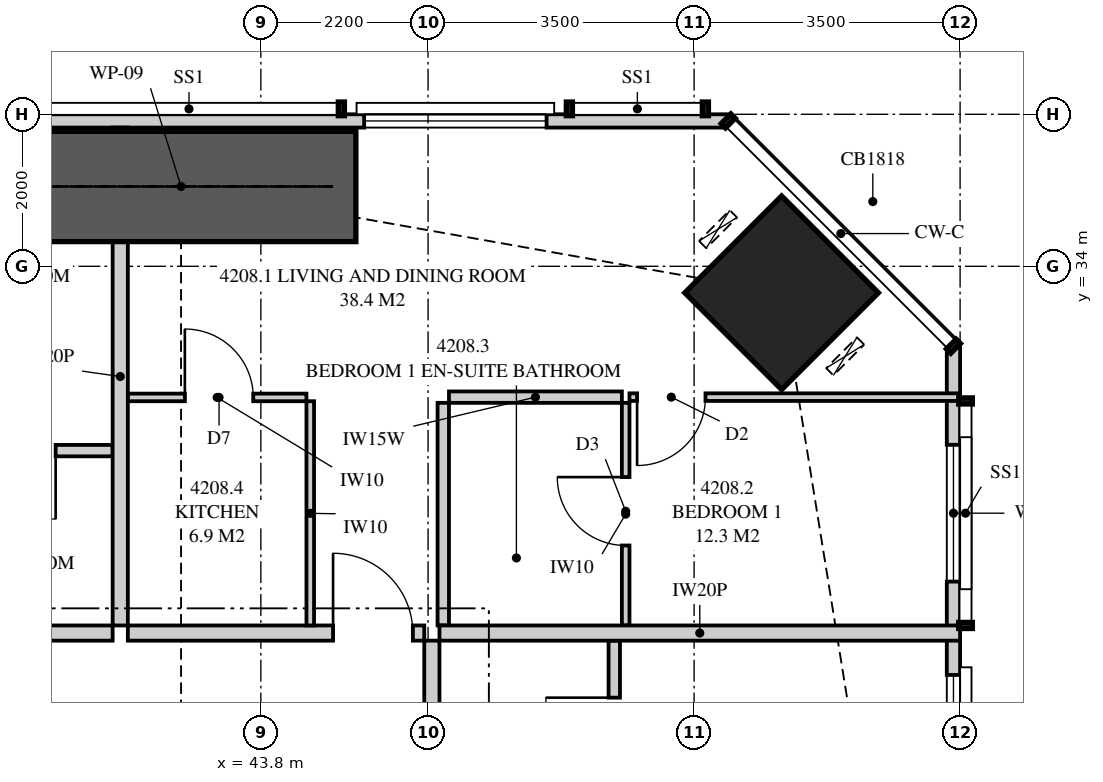
"""IFC4 building model, lengths in metres.
Left out: names, types, materials, properties, quantities, classifications, styles, units other than length and angle.
Written with IfcOpenShell. Run it as: python <this file> out.ifc"""

import sys

from ifc_helpers import new_model, si_unit, direction, frame, frame_2d, origin, origin_2d, place, context, subcontext, project, spatial, polyline, rectangle, hollow_rectangle, outline, extrude, element, fill, save


model = new_model("IFC4")
c1 = context("Model", 3, precision=1e-05, world=origin(), true_north=direction((0.0, 1.0)))
c2 = subcontext(c1, "Body", "Model", "MODEL_VIEW")
j1 = project(units=[si_unit("LENGTHUNIT", "METRE"), si_unit("PLANEANGLEUNIT", "RADIAN")], contexts=[c1])
p1 = place(None, origin())
s1 = spatial("IfcSite", under=j1, at=p1, CompositionType="ELEMENT")
p2 = place(p1, origin())
s2 = spatial("IfcBuilding", under=s1, at=p2, CompositionType="ELEMENT")
p3 = place(p2, frame((0.0, 0.0, 157.7)))
s3 = spatial("IfcBuildingStorey", under=s2, at=p3, CompositionType="ELEMENT", Elevation=157.7)
p4 = place(p3, frame((50.652, 33.652, 0.0), z_axis=(0.0, 0.0, 1.0), x_axis=(-0.707106781187, -0.707106781187, 0.0)))
e1 = element("IfcColumn", 1, at=p4, inside=s3, PredefinedType="COLUMN", context=c2, shape_type="SweptSolid", body=[
    extrude(hollow_rectangle(XDim=1.8, YDim=1.8, WallThickness=0.125, at=origin_2d()), origin(), (0.0, 0.0, 1.0), 3.35),
])
p5 = place(p3, frame((52.913, 3.051, 0.0), z_axis=(0.0, 0.0, 1.0), x_axis=(0.0, 1.0, 0.0)))
e2 = element("IfcWall", 2, at=p5, inside=s3, PredefinedType="SOLIDWALL", context=c2, shape_type="SweptSolid", body=[
    extrude(outline(polyline([(0.0, 0.0), (29.897, 0.0), (29.897, 3.11), (22.167, 3.11), (22.167, 2.15), (22.074, 2.15), (22.074, 3.11), (21.949, 3.11), (21.949, 2.15), (9.949, 2.15), (9.949, 3.11), (9.847, 3.11), (9.847, 2.15), (9.706, 2.15), (9.706, 3.11), (0.0, 3.11), (0.0, 0.0)])), frame((0.0, 0.087, 0.0), z_axis=(0.0, -1.0, 0.0), x_axis=(1.0, 0.0, 0.0)), (0.0, 0.0, 1.0), 0.175),
])
p6 = place(p5, frame((1.797, 0.0, 0.4)))
e3 = element("IfcOpeningElement", 3, at=p6, cuts=e2, PredefinedType="OPENING", context=c2, shape_type="SweptSolid", body=[
    extrude(rectangle(XDim=1.8, YDim=1.7, at=frame_2d((0.9, 0.85))), frame((0.0, 0.097, 0.0), z_axis=(0.0, -1.0, 0.0), x_axis=(1.0, 0.0, 0.0)), (0.0, 0.0, 1.0), 0.195),
])
p7 = place(p5, frame((5.149, 0.0, 0.4)))
e4 = element("IfcOpeningElement", 4, at=p7, cuts=e2, PredefinedType="OPENING", context=c2, shape_type="SweptSolid", body=[
    extrude(rectangle(XDim=2.4, YDim=1.7, at=frame_2d((1.2, 0.85))), frame((0.0, 0.097, 0.0), z_axis=(0.0, -1.0, 0.0), x_axis=(1.0, 0.0, 0.0)), (0.0, 0.0, 1.0), 0.195),
])
p8 = place(p5, frame((15.274, 0.0, 0.0)))
e5 = element("IfcOpeningElement", 5, at=p8, cuts=e2, PredefinedType="OPENING", context=c2, shape_type="SweptSolid", body=[
    extrude(rectangle(XDim=1.8, YDim=2.1, at=frame_2d((0.9, 1.05))), frame((0.0, 0.097, 0.0), z_axis=(0.0, -1.0, 0.0), x_axis=(1.0, 0.0, 0.0)), (0.0, 0.0, 1.0), 0.195),
])
p9 = place(p5, frame((12.349, 0.0, 0.4)))
e6 = element("IfcOpeningElement", 6, at=p9, cuts=e2, PredefinedType="OPENING", context=c2, shape_type="SweptSolid", body=[
    extrude(rectangle(XDim=2.4, YDim=1.7, at=frame_2d((1.2, 0.85))), frame((0.0, 0.097, 0.0), z_axis=(0.0, -1.0, 0.0), x_axis=(1.0, 0.0, 0.0)), (0.0, 0.0, 1.0), 0.195),
])
p10 = place(p5, frame((24.373, 0.0, 0.4)))
e7 = element("IfcOpeningElement", 7, at=p10, cuts=e2, PredefinedType="OPENING", context=c2, shape_type="SweptSolid", body=[
    extrude(rectangle(XDim=1.2, YDim=1.7, at=frame_2d((0.6, 0.85))), frame((0.0, 0.097, 0.0), z_axis=(0.0, -1.0, 0.0), x_axis=(1.0, 0.0, 0.0)), (0.0, 0.0, 1.0), 0.195),
])
p11 = place(p5, frame((26.801, 0.0, 0.4)))
e8 = element("IfcOpeningElement", 8, at=p11, cuts=e2, PredefinedType="OPENING", context=c2, shape_type="SweptSolid", body=[
    extrude(rectangle(XDim=1.8, YDim=1.7, at=frame_2d((0.9, 0.85))), frame((0.0, 0.097, 0.0), z_axis=(0.0, -1.0, 0.0), x_axis=(1.0, 0.0, 0.0)), (0.0, 0.0, 1.0), 0.195),
])
p12 = place(p3, frame((49.949, 35.913, 0.0), z_axis=(0.0, 0.0, 1.0), x_axis=(-1.0, 0.0, 0.0)))
e9 = element("IfcWall", 9, at=p12, inside=s3, PredefinedType="SOLIDWALL", context=c2, shape_type="SweptSolid", body=[
    extrude(outline(polyline([(0.0, 0.0), (34.897, 0.0), (34.897, 3.11), (27.91, 3.11), (27.91, 2.15), (27.836, 2.15), (27.836, 3.11), (27.699, 3.11), (27.699, 2.15), (7.199, 2.15), (7.199, 3.11), (7.062, 3.11), (7.062, 2.15), (6.987, 2.15), (6.987, 3.11), (0.0, 3.11), (0.0, 0.0)])), frame((0.0, 0.087, 0.0), z_axis=(0.0, -1.0, 0.0), x_axis=(1.0, 0.0, 0.0)), (0.0, 0.0, 1.0), 0.175),
])
p13 = place(p12, frame((2.389, 0.0, 0.4)))
e10 = element("IfcOpeningElement", 10, at=p13, cuts=e9, PredefinedType="OPENING", context=c2, shape_type="SweptSolid", body=[
    extrude(rectangle(XDim=2.4, YDim=1.7, at=frame_2d((1.2, 0.85))), frame((0.0, 0.097, 0.0), z_axis=(0.0, -1.0, 0.0), x_axis=(1.0, 0.0, 0.0)), (0.0, 0.0, 1.0), 0.195),
])
p14 = place(p12, frame((10.299, 0.0, 0.0)))
e11 = element("IfcOpeningElement", 11, at=p14, cuts=e9, PredefinedType="OPENING", context=c2, shape_type="SweptSolid", body=[
    extrude(rectangle(XDim=1.8, YDim=2.1, at=frame_2d((0.9, 1.05))), frame((0.0, 0.097, 0.0), z_axis=(0.0, -1.0, 0.0), x_axis=(1.0, 0.0, 0.0)), (0.0, 0.0, 1.0), 0.195),
])
p15 = place(p12, frame((12.649, 0.0, 0.4)))
e12 = element("IfcOpeningElement", 12, at=p15, cuts=e9, PredefinedType="OPENING", context=c2, shape_type="SweptSolid", body=[
    extrude(rectangle(XDim=2.4, YDim=1.7, at=frame_2d((1.2, 0.85))), frame((0.0, 0.097, 0.0), z_axis=(0.0, -1.0, 0.0), x_axis=(1.0, 0.0, 0.0)), (0.0, 0.0, 1.0), 0.195),
])
p16 = place(p12, frame((22.699, 0.0, 0.0)))
e13 = element("IfcOpeningElement", 13, at=p16, cuts=e9, PredefinedType="OPENING", context=c2, shape_type="SweptSolid", body=[
    extrude(rectangle(XDim=1.8, YDim=2.1, at=frame_2d((0.9, 1.05))), frame((0.0, 0.097, 0.0), z_axis=(0.0, -1.0, 0.0), x_axis=(1.0, 0.0, 0.0)), (0.0, 0.0, 1.0), 0.195),
])
p17 = place(p12, frame((19.849, 0.0, 0.4)))
e14 = element("IfcOpeningElement", 14, at=p17, cuts=e9, PredefinedType="OPENING", context=c2, shape_type="SweptSolid", body=[
    extrude(rectangle(XDim=2.4, YDim=1.7, at=frame_2d((1.2, 0.85))), frame((0.0, 0.097, 0.0), z_axis=(0.0, -1.0, 0.0), x_axis=(1.0, 0.0, 0.0)), (0.0, 0.0, 1.0), 0.195),
])
p18 = place(p12, frame((30.973, 0.0, 0.4)))
e15 = element("IfcOpeningElement", 15, at=p18, cuts=e9, PredefinedType="OPENING", context=c2, shape_type="SweptSolid", body=[
    extrude(rectangle(XDim=2.4, YDim=1.7, at=frame_2d((1.2, 0.85))), frame((0.0, 0.097, 0.0), z_axis=(0.0, -1.0, 0.0), x_axis=(1.0, 0.0, 0.0)), (0.0, 0.0, 1.0), 0.195),
])
p19 = place(p3, frame((41.95, 35.825, 0.0), z_axis=(0.0, 0.0, 1.0), x_axis=(0.0, -1.0, 0.0)))
e16 = element("IfcWall", 16, at=p19, inside=s3, PredefinedType="PARTITIONING", context=c2, shape_type="SweptSolid", body=[
    extrude(outline(polyline([(0.529, 2.15), (0.0, 2.15), (0.0, 0.0), (0.529, 0.0), (0.529, 0.876), (1.021, 0.876), (1.021, 0.0), (6.55, 0.0), (6.55, 3.11), (1.685, 3.11), (1.685, 2.15), (1.021, 2.15), (1.021, 1.274), (0.529, 1.274), (0.529, 2.15)])), frame((0.0, 0.1, 0.0), z_axis=(0.0, -1.0, 0.0), x_axis=(1.0, 0.0, 0.0)), (0.0, 0.0, 1.0), 0.2),
])
p20 = place(p3, frame((34.3, 29.175, 0.0), z_axis=(0.0, 0.0, 1.0), x_axis=(1.0, 0.0, 0.0)))
e17 = element("IfcWall", 17, at=p20, inside=s3, PredefinedType="PARTITIONING", context=c2, shape_type="SweptSolid", body=[
    extrude(rectangle(XDim=7.55, YDim=0.2, at=frame_2d((3.775, 0.0))), origin(), (0.0, 0.0, 1.0), 3.11),
])
p21 = place(p20, frame((3.275, 0.0, 0.0)))
e18 = element("IfcOpeningElement", 18, at=p21, cuts=e17, PredefinedType="OPENING", context=c2, shape_type="SweptSolid", body=[
    extrude(rectangle(XDim=1.05, YDim=2.2, at=frame_2d((0.525, 1.1))), frame((0.0, 0.11, 0.0), z_axis=(0.0, -1.0, 0.0), x_axis=(1.0, 0.0, 0.0)), (0.0, 0.0, 1.0), 0.22),
])
p22 = place(p3, frame((39.425, 31.575, 0.0), z_axis=(0.0, 0.0, 1.0), x_axis=(1.0, 0.0, 0.0)))
e19 = element("IfcWall", 19, at=p22, inside=s3, PredefinedType="PLUMBINGWALL", context=c2, shape_type="SweptSolid", body=[
    extrude(rectangle(XDim=2.425, YDim=0.15, at=frame_2d((1.212, 0.0))), origin(), (0.0, 0.0, 1.0), 3.11),
])
p23 = place(p22, frame((0.775, 0.0, 0.0)))
e20 = element("IfcOpeningElement", 20, at=p23, cuts=e19, PredefinedType="OPENING", context=c2, shape_type="SweptSolid", body=[
    extrude(rectangle(XDim=0.9, YDim=2.1, at=frame_2d((0.45, 1.05))), frame((0.0, 0.085, 0.0), z_axis=(0.0, -1.0, 0.0), x_axis=(1.0, 0.0, 0.0)), (0.0, 0.0, 1.0), 0.17),
])
p24 = place(p3, frame((42.05, 29.175, 0.0), z_axis=(0.0, 0.0, 1.0), x_axis=(1.0, 0.0, 0.0)))
e21 = element("IfcWall", 21, at=p24, inside=s3, PredefinedType="PARTITIONING", context=c2, shape_type="SweptSolid", body=[
    extrude(outline(polyline([(0.0, 0.0), (3.9, 0.0), (3.9, 3.11), (1.046, 3.11), (1.046, 2.531), (0.354, 2.531), (0.354, 3.11), (0.0, 3.11), (0.0, 0.0)])), frame((0.0, 0.1, 0.0), z_axis=(0.0, -1.0, 0.0), x_axis=(1.0, 0.0, 0.0)), (0.0, 0.0, 1.0), 0.2),
])
p25 = place(p24, frame((2.7, 0.0, 0.0)))
e22 = element("IfcOpeningElement", 22, at=p25, cuts=e21, PredefinedType="OPENING", context=c2, shape_type="SweptSolid", body=[
    extrude(rectangle(XDim=1.05, YDim=2.2, at=frame_2d((0.525, 1.1))), frame((0.0, 0.11, 0.0), z_axis=(0.0, -1.0, 0.0), x_axis=(1.0, 0.0, 0.0)), (0.0, 0.0, 1.0), 0.22),
])
p26 = place(p3, frame((48.6, 32.204, 0.0), z_axis=(0.0, 0.0, 1.0), x_axis=(0.0, -1.0, 0.0)))
e23 = element("IfcWall", 23, at=p26, inside=s3, PredefinedType="PARTITIONING", context=c2, shape_type="SweptSolid", body=[
    extrude(rectangle(XDim=2.929, YDim=0.1, at=frame_2d((1.464, 0.0))), origin(), (0.0, 0.0, 1.0), 3.11),
])
p27 = place(p26, frame((0.977, 0.0, 0.0)))
e24 = element("IfcOpeningElement", 24, at=p27, cuts=e23, PredefinedType="OPENING", context=c2, shape_type="SweptSolid", body=[
    extrude(rectangle(XDim=0.9, YDim=2.1, at=frame_2d((0.45, 1.05))), frame((0.0, 0.06, 0.0), z_axis=(0.0, -1.0, 0.0), x_axis=(1.0, 0.0, 0.0)), (0.0, 0.0, 1.0), 0.12),
])
p28 = place(p3, frame((48.65, 32.279, 0.0), z_axis=(0.0, 0.0, 1.0), x_axis=(1.0, 0.0, 0.0)))
e25 = element("IfcWall", 25, at=p28, inside=s3, PredefinedType="PARTITIONING", context=c2, shape_type="SweptSolid", body=[
    extrude(outline(polyline([(0.0, 0.0), (4.35, 0.0), (4.35, 3.11), (3.094, 3.11), (3.094, 2.15), (1.352, 2.15), (1.352, 3.11), (0.0, 3.11), (0.0, 0.0)])), frame((0.0, 0.05, 0.0), z_axis=(0.0, -1.0, 0.0), x_axis=(1.0, 0.0, 0.0)), (0.0, 0.0, 1.0), 0.1),
])
p29 = place(p28, frame((0.1, 0.0, 0.0)))
e26 = element("IfcOpeningElement", 26, at=p29, cuts=e25, PredefinedType="OPENING", context=c2, shape_type="SweptSolid", body=[
    extrude(rectangle(XDim=0.9, YDim=2.1, at=frame_2d((0.45, 1.05))), frame((0.0, 0.06, 0.0), z_axis=(0.0, -1.0, 0.0), x_axis=(1.0, 0.0, 0.0)), (0.0, 0.0, 1.0), 0.12),
])
p30 = place(p3, frame((46.275, 32.279, 0.0), z_axis=(0.0, 0.0, 1.0), x_axis=(1.0, 0.0, 0.0)))
e27 = element("IfcWall", 27, at=p30, inside=s3, PredefinedType="PLUMBINGWALL", context=c2, shape_type="SweptSolid", body=[
    extrude(rectangle(XDim=2.275, YDim=0.15, at=frame_2d((1.138, 0.0))), origin(), (0.0, 0.0, 1.0), 3.11),
])
p31 = place(p3, frame((46.2, 32.204, 0.0), z_axis=(0.0, 0.0, 1.0), x_axis=(0.0, -1.0, 0.0)))
e28 = element("IfcWall", 28, at=p31, inside=s3, PredefinedType="PLUMBINGWALL", context=c2, shape_type="SweptSolid", body=[
    extrude(rectangle(XDim=2.929, YDim=0.15, at=frame_2d((1.464, 0.0))), origin(), (0.0, 0.0, 1.0), 3.11),
])
p32 = place(p3, frame((42.05, 32.275, 0.0), z_axis=(0.0, 0.0, 1.0), x_axis=(1.0, 0.0, 0.0)))
e29 = element("IfcWall", 29, at=p32, inside=s3, PredefinedType="PARTITIONING", context=c2, shape_type="SweptSolid", body=[
    extrude(outline(polyline([(0.0, 0.0), (2.35, 0.0), (2.35, 3.11), (0.996, 3.11), (0.996, 2.531), (0.404, 2.531), (0.404, 3.11), (0.0, 3.11), (0.0, 0.0)])), frame((0.0, 0.05, 0.0), z_axis=(0.0, -1.0, 0.0), x_axis=(1.0, 0.0, 0.0)), (0.0, 0.0, 1.0), 0.1),
])
p33 = place(p32, frame((0.75, 0.0, 0.0)))
e30 = element("IfcOpeningElement", 30, at=p33, cuts=e29, PredefinedType="OPENING", context=c2, shape_type="SweptSolid", body=[
    extrude(rectangle(XDim=0.9, YDim=2.1, at=frame_2d((0.45, 1.05))), frame((0.0, 0.06, 0.0), z_axis=(0.0, -1.0, 0.0), x_axis=(1.0, 0.0, 0.0)), (0.0, 0.0, 1.0), 0.12),
])
p34 = place(p3, frame((44.45, 32.225, 0.0), z_axis=(0.0, 0.0, 1.0), x_axis=(0.0, -1.0, 0.0)))
e31 = element("IfcWall", 31, at=p34, inside=s3, PredefinedType="PARTITIONING", context=c2, shape_type="SweptSolid", body=[
    extrude(rectangle(XDim=2.95, YDim=0.1, at=frame_2d((1.475, 0.0))), origin(), (0.0, 0.0, 1.0), 3.11),
])
p35 = place(p3, frame((46.15, 29.175, 0.0), z_axis=(0.0, 0.0, 1.0), x_axis=(1.0, 0.0, 0.0)))
e32 = element("IfcWall", 32, at=p35, inside=s3, PredefinedType="PARTITIONING", context=c2, shape_type="SweptSolid", body=[
    extrude(outline(polyline([(0.0, 0.0), (6.85, 0.0), (6.85, 3.11), (6.147, 3.11), (6.147, 2.15), (4.303, 2.15), (4.303, 3.11), (0.0, 3.11), (0.0, 0.0)])), frame((0.0, 0.1, 0.0), z_axis=(0.0, -1.0, 0.0), x_axis=(1.0, 0.0, 0.0)), (0.0, 0.0, 1.0), 0.2),
])
p36 = place(p3, frame((46.05, 22.9, 0.0), z_axis=(0.0, 0.0, 1.0), x_axis=(0.0, 1.0, 0.0)))
e33 = element("IfcWall", 33, at=p36, inside=s3, PredefinedType="PARTITIONING", context=c2, shape_type="SweptSolid", body=[
    extrude(outline(polyline([(0.0, 0.0), (6.175, 0.0), (6.175, 3.11), (2.446, 3.11), (2.446, 2.531), (1.754, 2.531), (1.754, 3.11), (0.0, 3.11), (0.0, 0.0)])), frame((0.0, 0.1, 0.0), z_axis=(0.0, -1.0, 0.0), x_axis=(1.0, 0.0, 0.0)), (0.0, 0.0, 1.0), 0.2),
])
p37 = place(p36, frame((2.587, 0.0, 0.0)))
e34 = element("IfcOpeningElement", 34, at=p37, cuts=e33, PredefinedType="OPENING", context=c2, shape_type="SweptSolid", body=[
    extrude(rectangle(XDim=1.05, YDim=2.2, at=frame_2d((0.525, 1.1))), frame((0.0, 0.11, 0.0), z_axis=(0.0, -1.0, 0.0), x_axis=(1.0, 0.0, 0.0)), (0.0, 0.0, 1.0), 0.22),
])
p38 = place(p3, frame((48.45, 26.65, 0.0), z_axis=(0.0, 0.0, 1.0), x_axis=(0.0, 1.0, 0.0)))
e35 = element("IfcWall", 35, at=p38, inside=s3, PredefinedType="PLUMBINGWALL", context=c2, shape_type="SweptSolid", body=[
    extrude(rectangle(XDim=2.425, YDim=0.15, at=frame_2d((1.212, 0.0))), origin(), (0.0, 0.0, 1.0), 3.11),
])
p39 = place(p38, frame((0.775, 0.0, 0.0)))
e36 = element("IfcOpeningElement", 36, at=p39, cuts=e35, PredefinedType="OPENING", context=c2, shape_type="SweptSolid", body=[
    extrude(rectangle(XDim=0.9, YDim=2.1, at=frame_2d((0.45, 1.05))), frame((0.0, 0.085, 0.0), z_axis=(0.0, -1.0, 0.0), x_axis=(1.0, 0.0, 0.0)), (0.0, 0.0, 1.0), 0.17),
])
p40 = place(p3, frame((40.45, 35.05, 0.0), z_axis=(0.0, 0.0, 1.0), x_axis=(1.0, 0.0, 0.0)))
e37 = element("IfcWall", 37, at=p40, inside=s3, PredefinedType="SHEAR", context=c2, shape_type="SweptSolid", body=[
    extrude(rectangle(XDim=4.6, YDim=1.45, at=frame_2d((2.3, 0.0))), origin(), (0.0, 0.0, 1.0), 3.35),
])
p41 = place(p10, origin())
e38 = element("IfcWindow", 38, at=p41, inside=s3, PartitioningType="SINGLE_PANEL", PredefinedType="WINDOW", context=c2, shape_type="SweptSolid", body=[
    extrude(rectangle(XDim=1.2, YDim=1.7, at=frame_2d((0.6, 0.85))), frame((0.0, 0.03, 0.0), z_axis=(0.0, -1.0, 0.0), x_axis=(1.0, 0.0, 0.0)), (0.0, 0.0, 1.0), 0.06),
])
fill(e7, e38)
p42 = place(p11, origin())
e39 = element("IfcWindow", 39, at=p42, inside=s3, PartitioningType="SINGLE_PANEL", PredefinedType="WINDOW", context=c2, shape_type="SweptSolid", body=[
    extrude(rectangle(XDim=1.8, YDim=1.7, at=frame_2d((0.9, 0.85))), frame((0.0, 0.03, 0.0), z_axis=(0.0, -1.0, 0.0), x_axis=(1.0, 0.0, 0.0)), (0.0, 0.0, 1.0), 0.06),
])
fill(e8, e39)
p43 = place(p13, origin())
e40 = element("IfcWindow", 40, at=p43, inside=s3, PartitioningType="SINGLE_PANEL", PredefinedType="WINDOW", context=c2, shape_type="SweptSolid", body=[
    extrude(rectangle(XDim=2.4, YDim=1.7, at=frame_2d((1.2, 0.85))), frame((0.0, 0.03, 0.0), z_axis=(0.0, -1.0, 0.0), x_axis=(1.0, 0.0, 0.0)), (0.0, 0.0, 1.0), 0.06),
])
fill(e10, e40)
p44 = place(p23, frame((0.9, 0.0, 0.0), z_axis=(0.0, 0.0, 1.0), x_axis=(-1.0, 0.0, 0.0)))
e41 = element("IfcDoor", 41, at=p44, inside=s3, OperationType="SINGLE_SWING_LEFT", PredefinedType="DOOR", context=c2, shape_type="SweptSolid", body=[
    extrude(rectangle(XDim=0.9, YDim=2.1, at=frame_2d((0.45, 1.05))), frame((0.0, 0.025, 0.0), z_axis=(0.0, -1.0, 0.0), x_axis=(1.0, 0.0, 0.0)), (0.0, 0.0, 1.0), 0.05),
])
fill(e20, e41)
p45 = place(p25, origin())
e42 = element("IfcDoor", 42, at=p45, inside=s3, OperationType="SINGLE_SWING_LEFT", PredefinedType="DOOR", context=c2, shape_type="SweptSolid", body=[
    extrude(rectangle(XDim=1.05, YDim=2.2, at=frame_2d((0.525, 1.1))), frame((0.0, 0.025, 0.0), z_axis=(0.0, -1.0, 0.0), x_axis=(1.0, 0.0, 0.0)), (0.0, 0.0, 1.0), 0.05),
])
fill(e22, e42)
p46 = place(p29, frame((0.9, 0.0, 0.0), z_axis=(0.0, 0.0, 1.0), x_axis=(-1.0, 0.0, 0.0)))
e43 = element("IfcDoor", 43, at=p46, inside=s3, OperationType="SINGLE_SWING_RIGHT", PredefinedType="DOOR", context=c2, shape_type="SweptSolid", body=[
    extrude(rectangle(XDim=0.9, YDim=2.1, at=frame_2d((0.45, 1.05))), frame((0.0, 0.025, 0.0), z_axis=(0.0, -1.0, 0.0), x_axis=(1.0, 0.0, 0.0)), (0.0, 0.0, 1.0), 0.05),
])
fill(e26, e43)
p47 = place(p27, frame((0.9, 0.0, 0.0), z_axis=(0.0, 0.0, 1.0), x_axis=(-1.0, 0.0, 0.0)))
e44 = element("IfcDoor", 44, at=p47, inside=s3, OperationType="SINGLE_SWING_RIGHT", PredefinedType="DOOR", context=c2, shape_type="SweptSolid", body=[
    extrude(rectangle(XDim=0.9, YDim=2.1, at=frame_2d((0.45, 1.05))), frame((0.0, 0.025, 0.0), z_axis=(0.0, -1.0, 0.0), x_axis=(1.0, 0.0, 0.0)), (0.0, 0.0, 1.0), 0.05),
])
fill(e24, e44)
p48 = place(p33, origin())
e45 = element("IfcDoor", 45, at=p48, inside=s3, OperationType="SINGLE_SWING_LEFT", PredefinedType="DOOR", context=c2, shape_type="SweptSolid", body=[
    extrude(rectangle(XDim=0.9, YDim=2.1, at=frame_2d((0.45, 1.05))), frame((0.0, 0.025, 0.0), z_axis=(0.0, -1.0, 0.0), x_axis=(1.0, 0.0, 0.0)), (0.0, 0.0, 1.0), 0.05),
])
fill(e30, e45)
p49 = place(p39, origin())
e46 = element("IfcDoor", 46, at=p49, inside=s3, OperationType="SINGLE_SWING_RIGHT", PredefinedType="DOOR", context=c2, shape_type="SweptSolid", body=[
    extrude(rectangle(XDim=0.9, YDim=2.1, at=frame_2d((0.45, 1.05))), frame((0.0, 0.025, 0.0), z_axis=(0.0, -1.0, 0.0), x_axis=(1.0, 0.0, 0.0)), (0.0, 0.0, 1.0), 0.05),
])
fill(e36, e46)
save(model, sys.argv[1])
